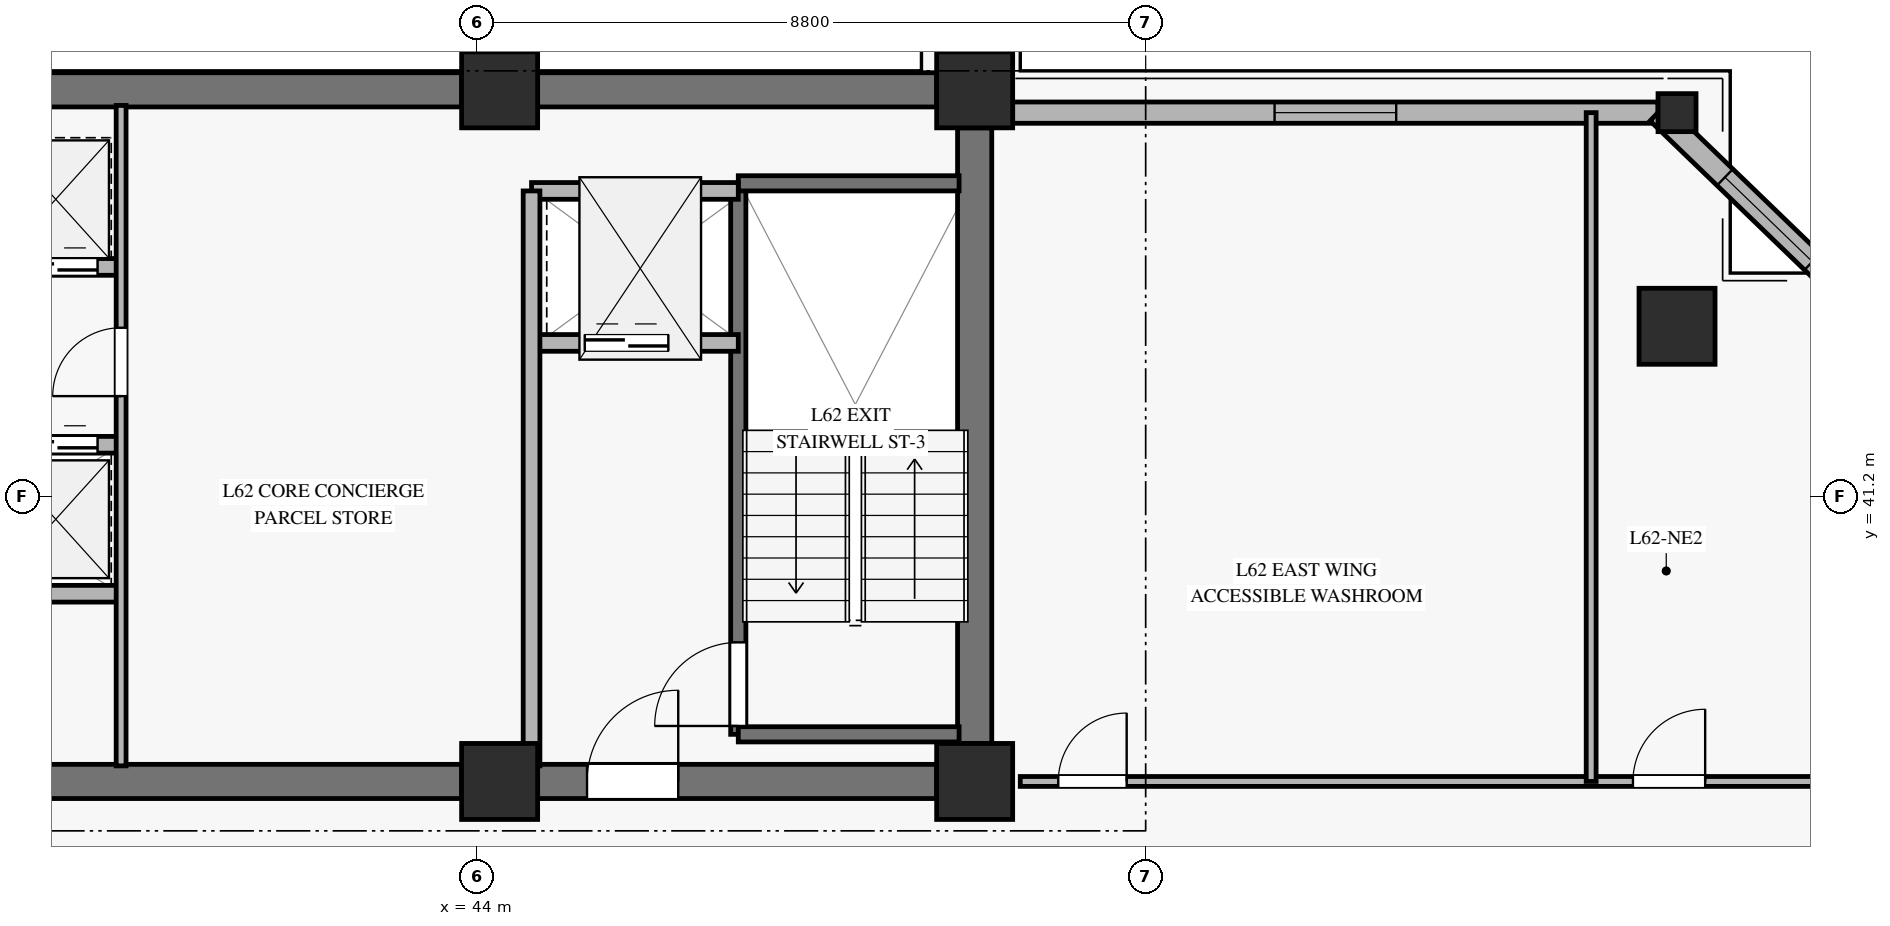
"""IFC4 building model, lengths in metres.
Left out: names, types, materials, properties, quantities, classifications, styles, units other than length and angle.
Written with IfcOpenShell. Run it as: python <this file> out.ifc"""

import sys

from ifc_helpers import new_model, si_unit, direction, frame, frame_2d, origin, origin_2d, place, context, subcontext, project, spatial, rectangle, hollow_rectangle, extrude, source, transform, mapped, element, fill, save


model = new_model("IFC4")
c1 = context("Model", 3, precision=1e-05, world=origin(), true_north=direction((0.0, 1.0)))
c2 = subcontext(c1, "Body", "Model", "MODEL_VIEW")
j1 = project(units=[si_unit("LENGTHUNIT", "METRE"), si_unit("PLANEANGLEUNIT", "RADIAN")], contexts=[c1])
p1 = place(None, origin())
s1 = spatial("IfcSite", under=j1, at=p1, CompositionType="ELEMENT")
p2 = place(p1, origin())
s2 = spatial("IfcBuilding", under=s1, at=p2, CompositionType="ELEMENT")
p3 = place(p2, frame((0.0, 0.0, 245.1)))
s3 = spatial("IfcBuildingStorey", under=s2, at=p3, CompositionType="ELEMENT", Elevation=245.1)
m1 = source(origin(), c2, "Body", "SweptSolid", [
    extrude(rectangle(XDim=1.0, YDim=1.0, at=origin_2d()), origin(), (0.0, 0.0, 1.0), 3.185),
])
for number, where, z_axis, x_axis in (
    (1, (44.3, 37.45, 0.0), (0.0, 0.0, 1.0), (1.0, 0.0, 0.0)),
    (2, (44.3, 46.55, 0.0), (0.0, 0.0, 1.0), (1.0, 0.0, 0.0)),
    (3, (50.55, 37.45, 0.0), (0.0, 0.0, 1.0), (1.0, 0.0, 0.0)),
    (4, (50.55, 46.55, 0.0), (0.0, 0.0, 1.0), (1.0, 0.0, 0.0)),
):
    element("IfcColumn", number, at=place(p3, frame(where, z_axis=z_axis, x_axis=x_axis)), inside=s3, PredefinedType="PILASTER", context=c2, shape_type="MappedRepresentation", body=[
        mapped(m1, transform((0.0, 0.0, 0.0), x_axis=(1.0, 0.0, 0.0), y_axis=(0.0, 1.0, 0.0), z_axis=(0.0, 0.0, 1.0), scale=1.0)),
    ])
p4 = place(p3, frame((36.1, 46.55, 0.0), z_axis=(0.0, 0.0, 1.0), x_axis=(1.0, 0.0, 0.0)))
e5 = element("IfcWall", 5, at=p4, inside=s3, PredefinedType="SHEAR", context=c2, shape_type="SweptSolid", body=[
    extrude(rectangle(XDim=7.7, YDim=0.45, at=frame_2d((3.85, 0.0))), origin(), (0.0, 0.0, 1.0), 3.185),
])
p5 = place(p3, frame((44.8, 46.55, 0.0), z_axis=(0.0, 0.0, 1.0), x_axis=(1.0, 0.0, 0.0)))
e6 = element("IfcWall", 6, at=p5, inside=s3, PredefinedType="SHEAR", context=c2, shape_type="SweptSolid", body=[
    extrude(rectangle(XDim=5.25, YDim=0.45, at=frame_2d((2.625, 0.0))), origin(), (0.0, 0.0, 1.0), 3.185),
])
p6 = place(p3, frame((36.1, 37.45, 0.0), z_axis=(0.0, 0.0, 1.0), x_axis=(1.0, 0.0, 0.0)))
e7 = element("IfcWall", 7, at=p6, inside=s3, PredefinedType="SHEAR", context=c2, shape_type="SweptSolid", body=[
    extrude(rectangle(XDim=7.7, YDim=0.45, at=frame_2d((3.85, 0.0))), origin(), (0.0, 0.0, 1.0), 3.185),
])
p7 = place(p3, frame((44.8, 37.45, 0.0), z_axis=(0.0, 0.0, 1.0), x_axis=(1.0, 0.0, 0.0)))
e8 = element("IfcWall", 8, at=p7, inside=s3, PredefinedType="SHEAR", context=c2, shape_type="SweptSolid", body=[
    extrude(rectangle(XDim=5.25, YDim=0.45, at=frame_2d((2.625, 0.0))), origin(), (0.0, 0.0, 1.0), 3.185),
])
p8 = place(p7, frame((0.65, 0.0, 0.0)))
e9 = element("IfcOpeningElement", 9, at=p8, cuts=e8, PredefinedType="OPENING", context=c2, shape_type="SweptSolid", body=[
    extrude(rectangle(XDim=1.2, YDim=2.15, at=frame_2d((0.6, 1.075))), frame((0.0, 0.235, 0.0), z_axis=(0.0, -1.0, 0.0), x_axis=(1.0, 0.0, 0.0)), (0.0, 0.0, 1.0), 0.47),
])
p9 = place(p3, frame((50.55, 37.95, 0.0), z_axis=(0.0, 0.0, 1.0), x_axis=(0.0, 1.0, 0.0)))
e10 = element("IfcWall", 10, at=p9, inside=s3, PredefinedType="SHEAR", context=c2, shape_type="SweptSolid", body=[
    extrude(rectangle(XDim=8.1, YDim=0.45, at=frame_2d((4.05, 0.0))), origin(), (0.0, 0.0, 1.0), 3.185),
])
m2 = source(origin(), c2, "Body", "SweptSolid", [
    extrude(hollow_rectangle(XDim=1.0, YDim=1.0, WallThickness=0.045, at=origin_2d()), origin(), (0.0, 0.0, 1.0), 3.207),
])
p10 = place(p3, frame((59.791, 43.439, 0.0), z_axis=(-0.115048619491, 0.014390595026, 0.993255619631), x_axis=(-0.12411555831, -0.992267770405, 0.0)))
e11 = element("IfcColumn", 11, at=p10, inside=s3, PredefinedType="COLUMN", context=c2, shape_type="MappedRepresentation", body=[
    mapped(m2, transform((0.0, 0.0, 0.0), x_axis=(1.0, 0.0, 0.0), y_axis=(0.0, 1.0, 0.0), z_axis=(0.0, 0.0, 1.0), scale=1.0)),
])
m3 = source(origin(), c2, "Body", "SweptSolid", [
    extrude(hollow_rectangle(XDim=0.5, YDim=0.5, WallThickness=0.024, at=origin_2d()), origin(), (0.0, 0.0, 1.0), 3.206),
])
p11 = place(p3, frame((59.791, 46.25, 0.0), z_axis=(-0.115060534006, 0.0, 0.993358481876), x_axis=(0.0, -1.0, 0.0)))
e12 = element("IfcColumn", 12, at=p11, inside=s3, PredefinedType="COLUMN", context=c2, shape_type="MappedRepresentation", body=[
    mapped(m3, transform((0.0, 0.0, 0.0), x_axis=(1.0, 0.0, 0.0), y_axis=(0.0, 1.0, 0.0), z_axis=(0.0, 0.0, 1.0), scale=1.0)),
])
p12 = place(p3, frame((51.05, 46.25, 0.0), z_axis=(0.0, 0.0, 1.0), x_axis=(1.0, 0.0, 0.0)))
e13 = element("IfcWall", 13, at=p12, inside=s3, PredefinedType="SOLIDWALL", context=c2, shape_type="SweptSolid", body=[
    extrude(rectangle(XDim=8.491, YDim=0.28, at=frame_2d((4.246, 0.0))), origin(), (0.0, 0.0, 1.0), 2.815),
])
p13 = place(p12, frame((3.446, 0.0, 0.45)))
e14 = element("IfcOpeningElement", 14, at=p13, cuts=e13, PredefinedType="OPENING", context=c2, shape_type="SweptSolid", body=[
    extrude(rectangle(XDim=1.6, YDim=2.0, at=frame_2d((0.8, 1.0))), frame((0.0, 0.15, 0.0), z_axis=(0.0, -1.0, 0.0), x_axis=(1.0, 0.0, 0.0)), (0.0, 0.0, 1.0), 0.3),
])
p14 = place(p3, frame((62.452, 43.439, 0.0), z_axis=(0.0, 0.0, 1.0), x_axis=(-0.719337004509, 0.694661265614, 0.0)))
e15 = element("IfcWall", 15, at=p14, inside=s3, PredefinedType="SOLIDWALL", context=c2, shape_type="SweptSolid", body=[
    extrude(rectangle(XDim=4.047, YDim=0.3, at=frame_2d((2.023, 0.0))), origin(), (0.0, 0.0, 1.0), 2.815),
])
p15 = place(p14, frame((1.223, 0.0, 0.45)))
e16 = element("IfcOpeningElement", 16, at=p15, cuts=e15, PredefinedType="OPENING", context=c2, shape_type="SweptSolid", body=[
    extrude(rectangle(XDim=1.6, YDim=2.0, at=frame_2d((0.8, 1.0))), frame((0.0, 0.16, 0.0), z_axis=(0.0, -1.0, 0.0), x_axis=(1.0, 0.0, 0.0)), (0.0, 0.0, 1.0), 0.32),
])
p16 = place(p3, frame((47.44, 38.07, 0.0), z_axis=(0.0, 0.0, 1.0), x_axis=(0.0, 1.0, 0.0)))
e17 = element("IfcWall", 17, at=p16, inside=s3, PredefinedType="SOLIDWALL", context=c2, shape_type="SweptSolid", body=[
    extrude(rectangle(XDim=7.25, YDim=0.2, at=frame_2d((3.625, 0.0))), origin(), (0.0, 0.0, 1.0), 3.4),
])
p17 = place(p16, frame((0.11, 0.0, 0.0)))
e18 = element("IfcOpeningElement", 18, at=p17, cuts=e17, PredefinedType="OPENING", context=c2, shape_type="SweptSolid", body=[
    extrude(rectangle(XDim=1.1, YDim=2.15, at=frame_2d((0.55, 1.075))), frame((0.0, 0.11, 0.0), z_axis=(0.0, -1.0, 0.0), x_axis=(1.0, 0.0, 0.0)), (0.0, 0.0, 1.0), 0.22),
])
for number, where, z_axis, x_axis in (
    (19, (47.44, 45.32, 0.0), (0.0, 0.0, 1.0), (1.0, 0.0, 0.0)),
    (20, (47.44, 38.07, 0.0), (0.0, 0.0, 1.0), (1.0, 0.0, 0.0)),
):
    element("IfcWall", number, at=place(p3, frame(where, z_axis=z_axis, x_axis=x_axis)), inside=s3, PredefinedType="SOLIDWALL", context=c2, shape_type="SweptSolid", body=[
        extrude(rectangle(XDim=2.905, YDim=0.2, at=frame_2d((1.453, 0.0))), origin(), (0.0, 0.0, 1.0), 3.4),
    ])
p18 = place(p3, frame((44.72, 43.22, 0.0), z_axis=(0.0, 0.0, 1.0), x_axis=(1.0, 0.0, 0.0)))
e21 = element("IfcWall", 21, at=p18, inside=s3, PredefinedType="SOLIDWALL", context=c2, shape_type="SweptSolid", body=[
    extrude(rectangle(XDim=2.72, YDim=0.22, at=frame_2d((1.36, 0.0))), origin(), (0.0, 0.0, 1.0), 3.185),
])
p19 = place(p18, frame((0.7, 0.0, 0.0)))
e22 = element("IfcOpeningElement", 22, at=p19, cuts=e21, PredefinedType="OPENING", context=c2, shape_type="SweptSolid", body=[
    extrude(rectangle(XDim=1.1, YDim=2.2, at=frame_2d((0.55, 1.1))), frame((0.0, 0.12, 0.0), z_axis=(0.0, -1.0, 0.0), x_axis=(1.0, 0.0, 0.0)), (0.0, 0.0, 1.0), 0.24),
])
p20 = place(p3, frame((44.72, 45.22, 0.0), z_axis=(0.0, 0.0, 1.0), x_axis=(1.0, 0.0, 0.0)))
e23 = element("IfcWall", 23, at=p20, inside=s3, PredefinedType="SOLIDWALL", context=c2, shape_type="SweptSolid", body=[
    extrude(rectangle(XDim=2.72, YDim=0.22, at=frame_2d((1.36, 0.0))), origin(), (0.0, 0.0, 1.0), 3.185),
])
p21 = place(p3, frame((44.72, 37.655, 0.0), z_axis=(0.0, 0.0, 1.0), x_axis=(0.0, 1.0, 0.0)))
e24 = element("IfcWall", 24, at=p21, inside=s3, PredefinedType="SOLIDWALL", context=c2, shape_type="SweptSolid", body=[
    extrude(rectangle(XDim=7.565, YDim=0.22, at=frame_2d((3.782, 0.0))), origin(), (0.0, 0.0, 1.0), 3.185),
])
p22 = place(p3, frame((36.12, 44.22, 0.0), z_axis=(0.0, 0.0, 1.0), x_axis=(1.0, 0.0, 0.0)))
e25 = element("IfcWall", 25, at=p22, inside=s3, PredefinedType="SOLIDWALL", context=c2, shape_type="SweptSolid", body=[
    extrude(rectangle(XDim=3.2, YDim=0.22, at=frame_2d((1.6, 0.0))), origin(), (0.0, 0.0, 1.0), 3.185),
])
p23 = place(p22, frame((0.3, 0.0, 0.0)))
e26 = element("IfcOpeningElement", 26, at=p23, cuts=e25, PredefinedType="OPENING", context=c2, shape_type="SweptSolid", body=[
    extrude(rectangle(XDim=1.1, YDim=2.2, at=frame_2d((0.55, 1.1))), frame((0.0, 0.12, 0.0), z_axis=(0.0, -1.0, 0.0), x_axis=(1.0, 0.0, 0.0)), (0.0, 0.0, 1.0), 0.24),
])
p24 = place(p22, frame((1.79, 0.0, 0.0)))
e27 = element("IfcOpeningElement", 27, at=p24, cuts=e25, PredefinedType="OPENING", context=c2, shape_type="SweptSolid", body=[
    extrude(rectangle(XDim=1.1, YDim=2.2, at=frame_2d((0.55, 1.1))), frame((0.0, 0.12, 0.0), z_axis=(0.0, -1.0, 0.0), x_axis=(1.0, 0.0, 0.0)), (0.0, 0.0, 1.0), 0.24),
])
p25 = place(p3, frame((36.12, 41.88, 0.0), z_axis=(0.0, 0.0, 1.0), x_axis=(1.0, 0.0, 0.0)))
e28 = element("IfcWall", 28, at=p25, inside=s3, PredefinedType="SOLIDWALL", context=c2, shape_type="SweptSolid", body=[
    extrude(rectangle(XDim=3.2, YDim=0.22, at=frame_2d((1.6, 0.0))), origin(), (0.0, 0.0, 1.0), 3.185),
])
p26 = place(p25, frame((0.3, 0.0, 0.0)))
e29 = element("IfcOpeningElement", 29, at=p26, cuts=e28, PredefinedType="OPENING", context=c2, shape_type="SweptSolid", body=[
    extrude(rectangle(XDim=1.1, YDim=2.2, at=frame_2d((0.55, 1.1))), frame((0.0, 0.12, 0.0), z_axis=(0.0, -1.0, 0.0), x_axis=(1.0, 0.0, 0.0)), (0.0, 0.0, 1.0), 0.24),
])
p27 = place(p25, frame((1.79, 0.0, 0.0)))
e30 = element("IfcOpeningElement", 30, at=p27, cuts=e28, PredefinedType="OPENING", context=c2, shape_type="SweptSolid", body=[
    extrude(rectangle(XDim=1.1, YDim=2.2, at=frame_2d((0.55, 1.1))), frame((0.0, 0.12, 0.0), z_axis=(0.0, -1.0, 0.0), x_axis=(1.0, 0.0, 0.0)), (0.0, 0.0, 1.0), 0.24),
])
p28 = place(p3, frame((36.12, 39.92, 0.0), z_axis=(0.0, 0.0, 1.0), x_axis=(1.0, 0.0, 0.0)))
e31 = element("IfcWall", 31, at=p28, inside=s3, PredefinedType="SOLIDWALL", context=c2, shape_type="SweptSolid", body=[
    extrude(rectangle(XDim=3.2, YDim=0.22, at=frame_2d((1.6, 0.0))), origin(), (0.0, 0.0, 1.0), 3.185),
])
p29 = place(p3, frame((39.32, 37.655, 0.0), z_axis=(0.0, 0.0, 1.0), x_axis=(0.0, 1.0, 0.0)))
e32 = element("IfcWall", 32, at=p29, inside=s3, PredefinedType="PARTITIONING", context=c2, shape_type="SweptSolid", body=[
    extrude(rectangle(XDim=8.69, YDim=0.13, at=frame_2d((4.345, 0.0))), origin(), (0.0, 0.0, 1.0), 3.185),
])
p30 = place(p29, frame((4.865, 0.0, 0.0)))
e33 = element("IfcOpeningElement", 33, at=p30, cuts=e32, PredefinedType="OPENING", context=c2, shape_type="SweptSolid", body=[
    extrude(rectangle(XDim=0.9, YDim=2.1, at=frame_2d((0.45, 1.05))), frame((0.0, 0.075, 0.0), z_axis=(0.0, -1.0, 0.0), x_axis=(1.0, 0.0, 0.0)), (0.0, 0.0, 1.0), 0.15),
])
p31 = place(p3, frame((51.15, 37.45, 0.0), z_axis=(0.0, 0.0, 1.0), x_axis=(1.0, 0.0, 0.0)))
e34 = element("IfcWall", 34, at=p31, inside=s3, PredefinedType="PARTITIONING", context=c2, shape_type="SweptSolid", body=[
    extrude(rectangle(XDim=11.302, YDim=0.13, at=frame_2d((5.651, 0.0))), origin(), (0.0, 0.0, 1.0), 2.82),
])
p32 = place(p31, frame((0.5, 0.0, 0.0)))
e35 = element("IfcOpeningElement", 35, at=p32, cuts=e34, PredefinedType="OPENING", context=c2, shape_type="SweptSolid", body=[
    extrude(rectangle(XDim=0.9, YDim=2.1, at=frame_2d((0.45, 1.05))), frame((0.0, 0.075, 0.0), z_axis=(0.0, -1.0, 0.0), x_axis=(1.0, 0.0, 0.0)), (0.0, 0.0, 1.0), 0.15),
])
p33 = place(p31, frame((8.061, 0.0, 0.0)))
e36 = element("IfcOpeningElement", 36, at=p33, cuts=e34, PredefinedType="OPENING", context=c2, shape_type="SweptSolid", body=[
    extrude(rectangle(XDim=0.95, YDim=2.1, at=frame_2d((0.475, 1.05))), frame((0.0, 0.075, 0.0), z_axis=(0.0, -1.0, 0.0), x_axis=(1.0, 0.0, 0.0)), (0.0, 0.0, 1.0), 0.15),
])
p34 = place(p3, frame((58.661, 37.45, 0.0), z_axis=(0.0, 0.0, 1.0), x_axis=(0.0, 1.0, 0.0)))
e37 = element("IfcWall", 37, at=p34, inside=s3, PredefinedType="PARTITIONING", context=c2, shape_type="SweptSolid", body=[
    extrude(rectangle(XDim=8.8, YDim=0.13, at=frame_2d((4.4, 0.0))), origin(), (0.0, 0.0, 1.0), 3.185),
])
m4 = source(origin(), c2, "Body", "SweptSolid", [
    extrude(rectangle(XDim=1.6, YDim=2.0, at=frame_2d((0.8, 1.0))), frame((0.0, 0.03, 0.0), z_axis=(0.0, -1.0, 0.0), x_axis=(1.0, 0.0, 0.0)), (0.0, 0.0, 1.0), 0.06),
])
p35 = place(p13, origin())
e38 = element("IfcWindow", 38, at=p35, inside=s3, PartitioningType="SINGLE_PANEL", PredefinedType="WINDOW", context=c2, shape_type="MappedRepresentation", body=[
    mapped(m4, transform((0.0, 0.0, 0.0), x_axis=(1.0, 0.0, 0.0), y_axis=(0.0, 1.0, 0.0), z_axis=(0.0, 0.0, 1.0), scale=1.0)),
])
fill(e14, e38)
p36 = place(p15, origin())
e39 = element("IfcWindow", 39, at=p36, inside=s3, PartitioningType="SINGLE_PANEL", PredefinedType="WINDOW", context=c2, shape_type="MappedRepresentation", body=[
    mapped(m4, transform((0.0, 0.0, 0.0), x_axis=(1.0, 0.0, 0.0), y_axis=(0.0, 1.0, 0.0), z_axis=(0.0, 0.0, 1.0), scale=1.0)),
])
fill(e16, e39)
m5 = source(origin(), c2, "Body", "SweptSolid", [
    extrude(rectangle(XDim=1.1, YDim=2.15, at=frame_2d((0.55, 1.075))), frame((0.0, 0.025, 0.0), z_axis=(0.0, -1.0, 0.0), x_axis=(1.0, 0.0, 0.0)), (0.0, 0.0, 1.0), 0.05),
])
p37 = place(p17, origin())
e40 = element("IfcDoor", 40, at=p37, inside=s3, OperationType="SINGLE_SWING_LEFT", PredefinedType="DOOR", context=c2, shape_type="MappedRepresentation", body=[
    mapped(m5, transform((0.0, 0.0, 0.0), x_axis=(1.0, 0.0, 0.0), y_axis=(0.0, 1.0, 0.0), z_axis=(0.0, 0.0, 1.0), scale=1.0)),
])
fill(e18, e40)
m6 = source(origin(), c2, "Body", "SweptSolid", [
    extrude(rectangle(XDim=1.1, YDim=2.2, at=frame_2d((0.55, 1.1))), frame((0.0, 0.025, 0.0), z_axis=(0.0, -1.0, 0.0), x_axis=(1.0, 0.0, 0.0)), (0.0, 0.0, 1.0), 0.05),
])
p38 = place(p19, origin())
e41 = element("IfcDoor", 41, at=p38, inside=s3, OperationType="SLIDING_TO_LEFT", PredefinedType="DOOR", context=c2, shape_type="MappedRepresentation", body=[
    mapped(m6, transform((0.0, 0.0, 0.0), x_axis=(1.0, 0.0, 0.0), y_axis=(0.0, 1.0, 0.0), z_axis=(0.0, 0.0, 1.0), scale=1.0)),
])
fill(e22, e41)
m7 = source(origin(), c2, "Body", "SweptSolid", [
    extrude(rectangle(XDim=1.2, YDim=2.15, at=frame_2d((0.6, 1.075))), frame((0.0, 0.025, 0.0), z_axis=(0.0, -1.0, 0.0), x_axis=(1.0, 0.0, 0.0)), (0.0, 0.0, 1.0), 0.05),
])
p39 = place(p8, origin())
e42 = element("IfcDoor", 42, at=p39, inside=s3, OperationType="SINGLE_SWING_RIGHT", PredefinedType="DOOR", context=c2, shape_type="MappedRepresentation", body=[
    mapped(m7, transform((0.0, 0.0, 0.0), x_axis=(1.0, 0.0, 0.0), y_axis=(0.0, 1.0, 0.0), z_axis=(0.0, 0.0, 1.0), scale=1.0)),
])
fill(e9, e42)
p40 = place(p24, origin())
e43 = element("IfcDoor", 43, at=p40, inside=s3, OperationType="SLIDING_TO_LEFT", PredefinedType="DOOR", context=c2, shape_type="MappedRepresentation", body=[
    mapped(m6, transform((0.0, 0.0, 0.0), x_axis=(1.0, 0.0, 0.0), y_axis=(0.0, 1.0, 0.0), z_axis=(0.0, 0.0, 1.0), scale=1.0)),
])
fill(e27, e43)
p41 = place(p27, origin())
e44 = element("IfcDoor", 44, at=p41, inside=s3, OperationType="SLIDING_TO_LEFT", PredefinedType="DOOR", context=c2, shape_type="MappedRepresentation", body=[
    mapped(m6, transform((0.0, 0.0, 0.0), x_axis=(1.0, 0.0, 0.0), y_axis=(0.0, 1.0, 0.0), z_axis=(0.0, 0.0, 1.0), scale=1.0)),
])
fill(e30, e44)
m8 = source(origin(), c2, "Body", "SweptSolid", [
    extrude(rectangle(XDim=0.9, YDim=2.1, at=frame_2d((0.45, 1.05))), frame((0.0, 0.025, 0.0), z_axis=(0.0, -1.0, 0.0), x_axis=(1.0, 0.0, 0.0)), (0.0, 0.0, 1.0), 0.05),
])
p42 = place(p30, origin())
e45 = element("IfcDoor", 45, at=p42, inside=s3, OperationType="SINGLE_SWING_LEFT", PredefinedType="DOOR", context=c2, shape_type="MappedRepresentation", body=[
    mapped(m8, transform((0.0, 0.0, 0.0), x_axis=(1.0, 0.0, 0.0), y_axis=(0.0, 1.0, 0.0), z_axis=(0.0, 0.0, 1.0), scale=1.0)),
])
fill(e33, e45)
p43 = place(p32, origin())
e46 = element("IfcDoor", 46, at=p43, inside=s3, OperationType="SINGLE_SWING_RIGHT", PredefinedType="DOOR", context=c2, shape_type="MappedRepresentation", body=[
    mapped(m8, transform((0.0, 0.0, 0.0), x_axis=(1.0, 0.0, 0.0), y_axis=(0.0, 1.0, 0.0), z_axis=(0.0, 0.0, 1.0), scale=1.0)),
])
fill(e35, e46)
m9 = source(origin(), c2, "Body", "SweptSolid", [
    extrude(rectangle(XDim=0.95, YDim=2.1, at=frame_2d((0.475, 1.05))), frame((0.0, 0.025, 0.0), z_axis=(0.0, -1.0, 0.0), x_axis=(1.0, 0.0, 0.0)), (0.0, 0.0, 1.0), 0.05),
])
p44 = place(p33, origin())
e47 = element("IfcDoor", 47, at=p44, inside=s3, OperationType="SINGLE_SWING_RIGHT", PredefinedType="DOOR", context=c2, shape_type="MappedRepresentation", body=[
    mapped(m9, transform((0.0, 0.0, 0.0), x_axis=(1.0, 0.0, 0.0), y_axis=(0.0, 1.0, 0.0), z_axis=(0.0, 0.0, 1.0), scale=1.0)),
])
fill(e36, e47)
save(model, sys.argv[1])
